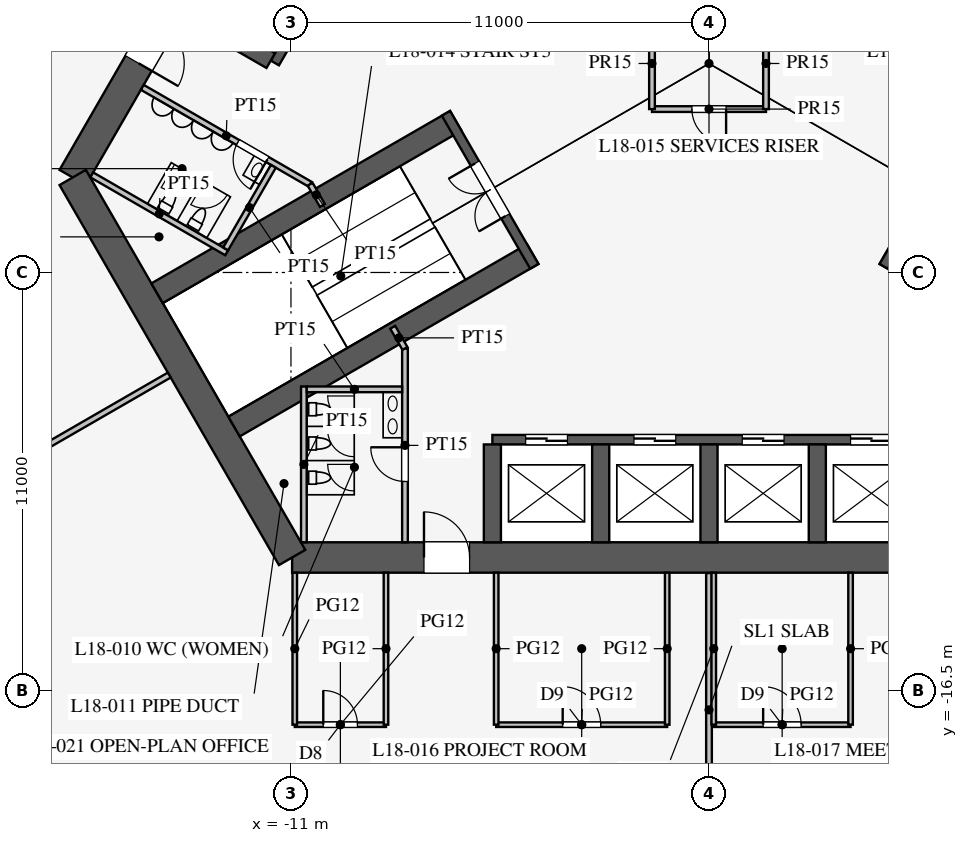
"""IFC4 building model, lengths in metres.
Left out: names, types, materials, properties, quantities, classifications, styles, units other than length and angle.
Written with IfcOpenShell. Run it as: python <this file> out.ifc"""

import sys

from ifc_helpers import new_model, si_unit, direction, frame, frame_2d, origin, place, context, subcontext, project, spatial, rectangle, extrude, element, fill, save


model = new_model("IFC4")
c1 = context("Model", 3, precision=1e-05, world=origin(), true_north=direction((0.0, 1.0)))
c2 = subcontext(c1, "Body", "Model", "MODEL_VIEW")
j1 = project(units=[si_unit("LENGTHUNIT", "METRE"), si_unit("PLANEANGLEUNIT", "RADIAN")], contexts=[c1])
p1 = place(None, origin())
s1 = spatial("IfcSite", under=j1, at=p1, CompositionType="ELEMENT")
p2 = place(p1, origin())
s2 = spatial("IfcBuilding", under=s1, at=p2, CompositionType="ELEMENT")
p3 = place(p2, frame((0.0, 0.0, 79.5)))
s3 = spatial("IfcBuildingStorey", under=s2, at=p3, CompositionType="ELEMENT", Elevation=79.5)
p4 = place(p3, frame((-10.97, -13.0, 0.0), z_axis=(0.0, 0.0, 1.0), x_axis=(1.0, 0.0, 0.0)))
e1 = element("IfcWall", 1, at=p4, inside=s3, PredefinedType="SHEAR", context=c2, shape_type="SweptSolid", body=[
    extrude(rectangle(XDim=21.939, YDim=0.8, at=frame_2d((10.97, 0.0))), origin(), (0.0, 0.0, 1.0), 4.2),
])
p5 = place(p4, frame((17.27, 0.0, 0.0)))
e2 = element("IfcOpeningElement", 2, at=p5, cuts=e1, PredefinedType="OPENING", context=c2, shape_type="SweptSolid", body=[
    extrude(rectangle(XDim=1.2, YDim=2.1, at=frame_2d((0.6, 1.05))), frame((0.0, 0.41, 0.0), z_axis=(0.0, -1.0, 0.0), x_axis=(1.0, 0.0, 0.0)), (0.0, 0.0, 1.0), 0.82),
])
p6 = place(p4, frame((3.47, 0.0, 0.0)))
e3 = element("IfcOpeningElement", 3, at=p6, cuts=e1, PredefinedType="OPENING", context=c2, shape_type="SweptSolid", body=[
    extrude(rectangle(XDim=1.2, YDim=2.1, at=frame_2d((0.6, 1.05))), frame((0.0, 0.41, 0.0), z_axis=(0.0, -1.0, 0.0), x_axis=(1.0, 0.0, 0.0)), (0.0, 0.0, 1.0), 0.82),
])
p7 = place(p3, frame((-5.773, 16.0, 0.0), z_axis=(0.0, 0.0, 1.0), x_axis=(-0.500002442456, -0.866023993627, 0.0)))
e4 = element("IfcWall", 4, at=p7, inside=s3, PredefinedType="SHEAR", context=c2, shape_type="SweptSolid", body=[
    extrude(rectangle(XDim=21.939, YDim=0.8, at=frame_2d((10.97, 0.0))), origin(), (0.0, 0.0, 1.0), 4.2),
])
p8 = place(p7, frame((17.27, 0.0, 0.0)))
e5 = element("IfcOpeningElement", 5, at=p8, cuts=e4, PredefinedType="OPENING", context=c2, shape_type="SweptSolid", body=[
    extrude(rectangle(XDim=1.2, YDim=2.1, at=frame_2d((0.6, 1.05))), frame((0.0, 0.41, 0.0), z_axis=(0.0, -1.0, 0.0), x_axis=(1.0, 0.0, 0.0)), (0.0, 0.0, 1.0), 0.82),
])
p9 = place(p7, frame((3.47, 0.0, 0.0)))
e6 = element("IfcOpeningElement", 6, at=p9, cuts=e4, PredefinedType="OPENING", context=c2, shape_type="SweptSolid", body=[
    extrude(rectangle(XDim=1.2, YDim=2.1, at=frame_2d((0.6, 1.05))), frame((0.0, 0.41, 0.0), z_axis=(0.0, -1.0, 0.0), x_axis=(1.0, 0.0, 0.0)), (0.0, 0.0, 1.0), 0.82),
])
p10 = place(p3, frame((-16.743, -3.0, 0.0), z_axis=(0.0, 0.0, 1.0), x_axis=(0.499995765644, -0.866027848477, 0.0)))
e7 = element("IfcWall", 7, at=p10, inside=s3, PredefinedType="SHEAR", context=c2, shape_type="SweptSolid", body=[
    extrude(rectangle(XDim=11.547, YDim=0.8, at=frame_2d((5.773, 0.0))), origin(), (0.0, 0.0, 1.0), 4.2),
])
p11 = place(p3, frame((-5.7, -9.9, 0.0), z_axis=(0.0, 0.0, 1.0), x_axis=(1.0, 0.0, 0.0)))
e8 = element("IfcWall", 8, at=p11, inside=s3, PredefinedType="SHEAR", context=c2, shape_type="SweptSolid", body=[
    extrude(rectangle(XDim=11.4, YDim=0.25, at=frame_2d((5.7, 0.0))), origin(), (0.0, 0.0, 1.0), 4.2),
])
p12 = place(p11, frame((0.875, 0.0, 0.0)))
e9 = element("IfcOpeningElement", 9, at=p12, cuts=e8, PredefinedType="OPENING", context=c2, shape_type="SweptSolid", body=[
    extrude(rectangle(XDim=1.1, YDim=2.2, at=frame_2d((0.55, 1.1))), frame((0.0, 0.135, 0.0), z_axis=(0.0, -1.0, 0.0), x_axis=(1.0, 0.0, 0.0)), (0.0, 0.0, 1.0), 0.27),
])
p13 = place(p11, frame((3.725, 0.0, 0.0)))
e10 = element("IfcOpeningElement", 10, at=p13, cuts=e8, PredefinedType="OPENING", context=c2, shape_type="SweptSolid", body=[
    extrude(rectangle(XDim=1.1, YDim=2.2, at=frame_2d((0.55, 1.1))), frame((0.0, 0.135, 0.0), z_axis=(0.0, -1.0, 0.0), x_axis=(1.0, 0.0, 0.0)), (0.0, 0.0, 1.0), 0.27),
])
p14 = place(p11, frame((6.575, 0.0, 0.0)))
e11 = element("IfcOpeningElement", 11, at=p14, cuts=e8, PredefinedType="OPENING", context=c2, shape_type="SweptSolid", body=[
    extrude(rectangle(XDim=1.1, YDim=2.2, at=frame_2d((0.55, 1.1))), frame((0.0, 0.135, 0.0), z_axis=(0.0, -1.0, 0.0), x_axis=(1.0, 0.0, 0.0)), (0.0, 0.0, 1.0), 0.27),
])
p15 = place(p11, frame((9.425, 0.0, 0.0)))
e12 = element("IfcOpeningElement", 12, at=p15, cuts=e8, PredefinedType="OPENING", context=c2, shape_type="SweptSolid", body=[
    extrude(rectangle(XDim=1.1, YDim=2.2, at=frame_2d((0.55, 1.1))), frame((0.0, 0.135, 0.0), z_axis=(0.0, -1.0, 0.0), x_axis=(1.0, 0.0, 0.0)), (0.0, 0.0, 1.0), 0.27),
])
for number, where, z_axis, x_axis in (
    (13, (-5.7, -10.025, 0.0), (0.0, 0.0, 1.0), (0.0, -1.0, 0.0)),
    (14, (-2.85, -10.025, 0.0), (0.0, 0.0, 1.0), (0.0, -1.0, 0.0)),
    (15, (0.0, -10.025, 0.0), (0.0, 0.0, 1.0), (0.0, -1.0, 0.0)),
    (16, (2.85, -10.025, 0.0), (0.0, 0.0, 1.0), (0.0, -1.0, 0.0)),
):
    element("IfcWall", number, at=place(p3, frame(where, z_axis=z_axis, x_axis=x_axis)), inside=s3, PredefinedType="SHEAR", context=c2, shape_type="SweptSolid", body=[
        extrude(rectangle(XDim=2.575, YDim=0.45, at=frame_2d((1.288, 0.0))), origin(), (0.0, 0.0, 1.0), 4.2),
    ])
p16 = place(p3, frame((-5.724, 9.886, 0.0), z_axis=(0.0, 0.0, 1.0), x_axis=(-0.500001763848, -0.866024385424, 0.0)))
e17 = element("IfcWall", 17, at=p16, inside=s3, PredefinedType="SHEAR", context=c2, shape_type="SweptSolid", body=[
    extrude(rectangle(XDim=11.4, YDim=0.25, at=frame_2d((5.7, 0.0))), origin(), (0.0, 0.0, 1.0), 4.2),
])
p17 = place(p16, frame((6.525, 0.0, 0.0)))
e18 = element("IfcOpeningElement", 18, at=p17, cuts=e17, PredefinedType="OPENING", context=c2, shape_type="SweptSolid", body=[
    extrude(rectangle(XDim=1.2, YDim=2.2, at=frame_2d((0.6, 1.1))), frame((0.0, 0.135, 0.0), z_axis=(0.0, -1.0, 0.0), x_axis=(1.0, 0.0, 0.0)), (0.0, 0.0, 1.0), 0.27),
])
p18 = place(p16, frame((9.375, 0.0, 0.0)))
e19 = element("IfcOpeningElement", 19, at=p18, cuts=e17, PredefinedType="OPENING", context=c2, shape_type="SweptSolid", body=[
    extrude(rectangle(XDim=1.2, YDim=2.2, at=frame_2d((0.6, 1.1))), frame((0.0, 0.135, 0.0), z_axis=(0.0, -1.0, 0.0), x_axis=(1.0, 0.0, 0.0)), (0.0, 0.0, 1.0), 0.27),
])
p19 = place(p3, frame((-11.532, 0.076, 0.0), z_axis=(0.0, 0.0, 1.0), x_axis=(-0.866005588531, 0.500034319456, 0.0)))
e20 = element("IfcWall", 20, at=p19, inside=s3, PredefinedType="SHEAR", context=c2, shape_type="SweptSolid", body=[
    extrude(rectangle(XDim=2.575, YDim=0.45, at=frame_2d((1.288, 0.0))), origin(), (0.0, 0.0, 1.0), 4.2),
])
p20 = place(p3, frame((4.638, -5.016, 0.0), z_axis=(0.0, 0.0, 1.0), x_axis=(0.866019375473, -0.500010441196, 0.0)))
e21 = element("IfcWall", 21, at=p20, inside=s3, PredefinedType="SHEAR", context=c2, shape_type="SweptSolid", body=[
    extrude(rectangle(XDim=9.075, YDim=0.6, at=frame_2d((4.538, 0.0))), origin(), (0.0, 0.0, 1.0), 4.2),
])
p21 = place(p3, frame((4.597, -5.339, 0.0), z_axis=(0.0, 0.0, 1.0), x_axis=(0.499984536904, 0.866034331223, 0.0)))
e22 = element("IfcWall", 22, at=p21, inside=s3, PredefinedType="SHEAR", context=c2, shape_type="SweptSolid", body=[
    extrude(rectangle(XDim=4.65, YDim=0.25, at=frame_2d((2.325, 0.0))), origin(), (0.0, 0.0, 1.0), 4.2),
])
p22 = place(p21, frame((1.525, 0.0, 0.0)))
e23 = element("IfcOpeningElement", 23, at=p22, cuts=e22, PredefinedType="OPENING", context=c2, shape_type="SweptSolid", body=[
    extrude(rectangle(XDim=1.6, YDim=2.1, at=frame_2d((0.8, 1.05))), frame((0.0, 0.135, 0.0), z_axis=(0.0, -1.0, 0.0), x_axis=(1.0, 0.0, 0.0)), (0.0, 0.0, 1.0), 0.27),
])
for number, where, z_axis, x_axis in (
    (24, (-6.663, -1.509, 0.0), (0.0, 0.0, 1.0), (-0.866, -0.5, 0.0)),
    (25, (-4.638, -5.016, 0.0), (0.0, 0.0, 1.0), (-0.866, -0.5, 0.0)),
):
    element("IfcWall", number, at=place(p3, frame(where, z_axis=z_axis, x_axis=x_axis)), inside=s3, PredefinedType="SHEAR", context=c2, shape_type="SweptSolid", body=[
        extrude(rectangle(XDim=9.075, YDim=0.6, at=frame_2d((4.538, 0.0))), origin(), (0.0, 0.0, 1.0), 4.2),
    ])
p23 = place(p3, frame((-6.922, -1.312, 0.0), z_axis=(0.0, 0.0, 1.0), x_axis=(0.499984536904, -0.866034331223, 0.0)))
e26 = element("IfcWall", 26, at=p23, inside=s3, PredefinedType="SHEAR", context=c2, shape_type="SweptSolid", body=[
    extrude(rectangle(XDim=4.65, YDim=0.25, at=frame_2d((2.325, 0.0))), origin(), (0.0, 0.0, 1.0), 4.2),
])
p24 = place(p23, frame((1.525, 0.0, 0.0)))
e27 = element("IfcOpeningElement", 27, at=p24, cuts=e26, PredefinedType="OPENING", context=c2, shape_type="SweptSolid", body=[
    extrude(rectangle(XDim=1.6, YDim=2.1, at=frame_2d((0.8, 1.05))), frame((0.0, 0.135, 0.0), z_axis=(0.0, -1.0, 0.0), x_axis=(1.0, 0.0, 0.0)), (0.0, 0.0, 1.0), 0.27),
])
p25 = place(p3, frame((-8.0, -7.5, 0.0), z_axis=(0.0, 0.0, 1.0), x_axis=(0.0, -1.0, 0.0)))
e28 = element("IfcWall", 28, at=p25, inside=s3, PredefinedType="PARTITIONING", context=c2, shape_type="SweptSolid", body=[
    extrude(rectangle(XDim=5.1, YDim=0.15, at=frame_2d((2.55, 0.0))), origin(), (0.0, 0.0, 1.0), 4.0),
])
p26 = place(p25, frame((2.6, 0.0, 0.0)))
e29 = element("IfcOpeningElement", 29, at=p26, cuts=e28, PredefinedType="OPENING", context=c2, shape_type="SweptSolid", body=[
    extrude(rectangle(XDim=0.9, YDim=2.1, at=frame_2d((0.45, 1.05))), frame((0.0, 0.085, 0.0), z_axis=(0.0, -1.0, 0.0), x_axis=(1.0, 0.0, 0.0)), (0.0, 0.0, 1.0), 0.17),
])
p27 = place(p3, frame((-10.495, -3.178, 0.0), z_axis=(0.0, 0.0, 1.0), x_axis=(-0.86602216432, 0.500005610874, 0.0)))
e30 = element("IfcWall", 30, at=p27, inside=s3, PredefinedType="PARTITIONING", context=c2, shape_type="SweptSolid", body=[
    extrude(rectangle(XDim=5.1, YDim=0.15, at=frame_2d((2.55, 0.0))), origin(), (0.0, 0.0, 1.0), 4.0),
])
p28 = place(p27, frame((1.3, 0.0, 0.0)))
e31 = element("IfcOpeningElement", 31, at=p28, cuts=e30, PredefinedType="OPENING", context=c2, shape_type="SweptSolid", body=[
    extrude(rectangle(XDim=0.9, YDim=2.1, at=frame_2d((0.45, 1.05))), frame((0.0, 0.085, 0.0), z_axis=(0.0, -1.0, 0.0), x_axis=(1.0, 0.0, 0.0)), (0.0, 0.0, 1.0), 0.17),
])
for number, where, z_axis, x_axis in (
    (32, (-10.495, -3.178, 0.0), (0.0, 0.0, 1.0), (0.5, -0.866, 0.0)),
    (33, (-8.0, -7.5, 0.0), (0.0, 0.0, 1.0), (-0.5, 0.866, 0.0)),
):
    element("IfcWall", number, at=place(p3, frame(where, z_axis=z_axis, x_axis=x_axis)), inside=s3, PredefinedType="PARTITIONING", context=c2, shape_type="SweptSolid", body=[
        extrude(rectangle(XDim=0.645, YDim=0.15, at=frame_2d((0.323, 0.0))), origin(), (0.0, 0.0, 1.0), 4.0),
    ])
p29 = place(p3, frame((-12.691, -4.982, 0.0), z_axis=(0.0, 0.0, 1.0), x_axis=(-0.8660249478, 0.500000789788, 0.0)))
e34 = element("IfcWall", 34, at=p29, inside=s3, PredefinedType="PARTITIONING", context=c2, shape_type="SweptSolid", body=[
    extrude(rectangle(XDim=4.1, YDim=0.15, at=frame_2d((2.05, 0.0))), origin(), (0.0, 0.0, 1.0), 4.0),
])
p30 = place(p3, frame((-11.464, -2.706, 0.0), z_axis=(0.0, 0.0, 1.0), x_axis=(-0.50001992892, -0.866013897511, 0.0)))
e35 = element("IfcWall", 35, at=p30, inside=s3, PredefinedType="PARTITIONING", context=c2, shape_type="SweptSolid", body=[
    extrude(rectangle(XDim=2.51, YDim=0.15, at=frame_2d((1.255, 0.0))), origin(), (0.0, 0.0, 1.0), 4.0),
])
p31 = place(p3, frame((-10.66, -8.5, 0.0), z_axis=(0.0, 0.0, 1.0), x_axis=(0.0, -1.0, 0.0)))
e36 = element("IfcWall", 36, at=p31, inside=s3, PredefinedType="PARTITIONING", context=c2, shape_type="SweptSolid", body=[
    extrude(rectangle(XDim=4.1, YDim=0.15, at=frame_2d((2.05, 0.0))), origin(), (0.0, 0.0, 1.0), 4.0),
])
p32 = place(p3, frame((-8.075, -8.575, 0.0), z_axis=(0.0, 0.0, 1.0), x_axis=(-1.0, 0.0, 0.0)))
e37 = element("IfcWall", 37, at=p32, inside=s3, PredefinedType="PARTITIONING", context=c2, shape_type="SweptSolid", body=[
    extrude(rectangle(XDim=2.51, YDim=0.15, at=frame_2d((1.255, 0.0))), origin(), (0.0, 0.0, 1.0), 4.0),
])
p33 = place(p3, frame((-1.5, -1.2, 0.0), z_axis=(0.0, 0.0, 1.0), x_axis=(1.0, 0.0, 0.0)))
e38 = element("IfcWall", 38, at=p33, inside=s3, PredefinedType="PARTITIONING", context=c2, shape_type="SweptSolid", body=[
    extrude(rectangle(XDim=3.0, YDim=0.15, at=frame_2d((1.5, 0.0))), origin(), (0.0, 0.0, 1.0), 4.0),
])
p34 = place(p33, frame((1.05, 0.0, 0.0)))
e39 = element("IfcOpeningElement", 39, at=p34, cuts=e38, PredefinedType="OPENING", context=c2, shape_type="SweptSolid", body=[
    extrude(rectangle(XDim=0.9, YDim=2.1, at=frame_2d((0.45, 1.05))), frame((0.0, 0.085, 0.0), z_axis=(0.0, -1.0, 0.0), x_axis=(1.0, 0.0, 0.0)), (0.0, 0.0, 1.0), 0.17),
])
for number, where, z_axis, x_axis in (
    (40, (1.5, -1.2, 0.0), (0.0, 0.0, 1.0), (0.0, 1.0, 0.0)),
    (41, (-1.5, 1.2, 0.0), (0.0, 0.0, 1.0), (0.0, -1.0, 0.0)),
):
    element("IfcWall", number, at=place(p3, frame(where, z_axis=z_axis, x_axis=x_axis)), inside=s3, PredefinedType="PARTITIONING", context=c2, shape_type="SweptSolid", body=[
        extrude(rectangle(XDim=2.4, YDim=0.15, at=frame_2d((1.2, 0.0))), origin(), (0.0, 0.0, 1.0), 4.0),
    ])
p35 = place(p3, frame((-14.203, -8.2, 0.0), z_axis=(0.0, 0.0, 1.0), x_axis=(-0.866024965723, -0.500000758745, 0.0)))
e42 = element("IfcWall", 42, at=p35, inside=s3, PredefinedType="PARTITIONING", context=c2, shape_type="SweptSolid", body=[
    extrude(rectangle(XDim=18.25, YDim=0.15, at=frame_2d((9.125, 0.0))), origin(), (0.0, 0.0, 1.0), 2.3),
])
p36 = place(p3, frame((0.0, -13.41, 0.0), z_axis=(0.0, 0.0, 1.0), x_axis=(0.0, -1.0, 0.0)))
e43 = element("IfcWall", 43, at=p36, inside=s3, PredefinedType="PARTITIONING", context=c2, shape_type="SweptSolid", body=[
    extrude(rectangle(XDim=12.709, YDim=0.15, at=frame_2d((6.354, 0.0))), origin(), (0.0, 0.0, 1.0), 2.8),
])
p37 = place(p3, frame((0.125, -17.4, 0.0), z_axis=(0.0, 0.0, 1.0), x_axis=(1.0, 0.0, 0.0)))
e44 = element("IfcWall", 44, at=p37, inside=s3, PredefinedType="PARTITIONING", context=c2, shape_type="SweptSolid", body=[
    extrude(rectangle(XDim=3.6, YDim=0.12, at=frame_2d((1.8, 0.0))), origin(), (0.0, 0.0, 1.0), 2.9),
])
p38 = place(p37, frame((1.3, 0.0, 0.15)))
e45 = element("IfcOpeningElement", 45, at=p38, cuts=e44, PredefinedType="OPENING", context=c2, shape_type="SweptSolid", body=[
    extrude(rectangle(XDim=1.0, YDim=2.1, at=frame_2d((0.5, 1.05))), frame((0.0, 0.07, 0.0), z_axis=(0.0, -1.0, 0.0), x_axis=(1.0, 0.0, 0.0)), (0.0, 0.0, 1.0), 0.14),
])
p39 = place(p3, frame((-10.9, -17.4, 0.0), z_axis=(0.0, 0.0, 1.0), x_axis=(1.0, 0.0, 0.0)))
e46 = element("IfcWall", 46, at=p39, inside=s3, PredefinedType="PARTITIONING", context=c2, shape_type="SweptSolid", body=[
    extrude(rectangle(XDim=2.4, YDim=0.12, at=frame_2d((1.2, 0.0))), origin(), (0.0, 0.0, 1.0), 2.9),
])
p40 = place(p39, frame((0.75, 0.0, 0.15)))
e47 = element("IfcOpeningElement", 47, at=p40, cuts=e46, PredefinedType="OPENING", context=c2, shape_type="SweptSolid", body=[
    extrude(rectangle(XDim=0.9, YDim=2.1, at=frame_2d((0.45, 1.05))), frame((0.0, 0.07, 0.0), z_axis=(0.0, -1.0, 0.0), x_axis=(1.0, 0.0, 0.0)), (0.0, 0.0, 1.0), 0.14),
])
p41 = place(p3, frame((-5.6, -17.4, 0.0), z_axis=(0.0, 0.0, 1.0), x_axis=(1.0, 0.0, 0.0)))
e48 = element("IfcWall", 48, at=p41, inside=s3, PredefinedType="PARTITIONING", context=c2, shape_type="SweptSolid", body=[
    extrude(rectangle(XDim=4.5, YDim=0.12, at=frame_2d((2.25, 0.0))), origin(), (0.0, 0.0, 1.0), 2.9),
])
p42 = place(p41, frame((1.75, 0.0, 0.15)))
e49 = element("IfcOpeningElement", 49, at=p42, cuts=e48, PredefinedType="OPENING", context=c2, shape_type="SweptSolid", body=[
    extrude(rectangle(XDim=1.0, YDim=2.1, at=frame_2d((0.5, 1.05))), frame((0.0, 0.07, 0.0), z_axis=(0.0, -1.0, 0.0), x_axis=(1.0, 0.0, 0.0)), (0.0, 0.0, 1.0), 0.14),
])
p43 = place(p3, frame((0.125, -13.4, 0.0), z_axis=(0.0, 0.0, 1.0), x_axis=(0.0, -1.0, 0.0)))
e50 = element("IfcWall", 50, at=p43, inside=s3, PredefinedType="PARTITIONING", context=c2, shape_type="SweptSolid", body=[
    extrude(rectangle(XDim=4.0, YDim=0.12, at=frame_2d((2.0, 0.0))), origin(), (0.0, 0.0, 1.0), 2.8),
])
for number, where, z_axis, x_axis in (
    (51, (3.725, -13.4, 0.0), (0.0, 0.0, 1.0), (0.0, -1.0, 0.0)),
    (52, (-1.1, -13.4, 0.0), (0.0, 0.0, 1.0), (0.0, -1.0, 0.0)),
    (53, (-10.9, -13.4, 0.0), (0.0, 0.0, 1.0), (0.0, -1.0, 0.0)),
    (54, (-5.6, -13.4, 0.0), (0.0, 0.0, 1.0), (0.0, -1.0, 0.0)),
    (55, (-8.5, -13.4, 0.0), (0.0, 0.0, 1.0), (0.0, -1.0, 0.0)),
):
    element("IfcWall", number, at=place(p3, frame(where, z_axis=z_axis, x_axis=x_axis)), inside=s3, PredefinedType="PARTITIONING", context=c2, shape_type="SweptSolid", body=[
        extrude(rectangle(XDim=4.0, YDim=0.12, at=frame_2d((2.0, 0.0))), origin(), (0.0, 0.0, 1.0), 2.9),
    ])
p44 = place(p26, frame((0.9, 0.0, 0.0), z_axis=(0.0, 0.0, 1.0), x_axis=(-1.0, 0.0, 0.0)))
e56 = element("IfcDoor", 56, at=p44, inside=s3, OperationType="SINGLE_SWING_RIGHT", PredefinedType="DOOR", context=c2, shape_type="SweptSolid", body=[
    extrude(rectangle(XDim=0.9, YDim=2.1, at=frame_2d((0.45, 1.05))), frame((0.0, 0.025, 0.0), z_axis=(0.0, -1.0, 0.0), x_axis=(1.0, 0.0, 0.0)), (0.0, 0.0, 1.0), 0.05),
])
fill(e29, e56)
p45 = place(p28, origin())
e57 = element("IfcDoor", 57, at=p45, inside=s3, OperationType="SINGLE_SWING_LEFT", PredefinedType="DOOR", context=c2, shape_type="SweptSolid", body=[
    extrude(rectangle(XDim=0.9, YDim=2.1, at=frame_2d((0.45, 1.05))), frame((0.0, 0.025, 0.0), z_axis=(0.0, -1.0, 0.0), x_axis=(1.0, 0.0, 0.0)), (0.0, 0.0, 1.0), 0.05),
])
fill(e31, e57)
p46 = place(p34, frame((0.9, 0.0, 0.0), z_axis=(0.0, 0.0, 1.0), x_axis=(-1.0, 0.0, 0.0)))
e58 = element("IfcDoor", 58, at=p46, inside=s3, OperationType="SINGLE_SWING_LEFT", PredefinedType="DOOR", context=c2, shape_type="SweptSolid", body=[
    extrude(rectangle(XDim=0.9, YDim=2.1, at=frame_2d((0.45, 1.05))), frame((0.0, 0.025, 0.0), z_axis=(0.0, -1.0, 0.0), x_axis=(1.0, 0.0, 0.0)), (0.0, 0.0, 1.0), 0.05),
])
fill(e39, e58)
p47 = place(p24, frame((1.6, 0.0, 0.0), z_axis=(0.0, 0.0, 1.0), x_axis=(-1.0, 0.0, 0.0)))
e59 = element("IfcDoor", 59, at=p47, inside=s3, OperationType="DOUBLE_DOOR_SINGLE_SWING", PredefinedType="DOOR", context=c2, shape_type="SweptSolid", body=[
    extrude(rectangle(XDim=1.6, YDim=2.1, at=frame_2d((0.8, 1.05))), frame((0.0, 0.025, 0.0), z_axis=(0.0, -1.0, 0.0), x_axis=(1.0, 0.0, 0.0)), (0.0, 0.0, 1.0), 0.05),
])
fill(e27, e59)
p48 = place(p6, origin())
e60 = element("IfcDoor", 60, at=p48, inside=s3, OperationType="SINGLE_SWING_LEFT", PredefinedType="DOOR", context=c2, shape_type="SweptSolid", body=[
    extrude(rectangle(XDim=1.2, YDim=2.1, at=frame_2d((0.6, 1.05))), frame((0.0, 0.025, 0.0), z_axis=(0.0, -1.0, 0.0), x_axis=(1.0, 0.0, 0.0)), (0.0, 0.0, 1.0), 0.05),
])
fill(e3, e60)
p49 = place(p8, origin())
e61 = element("IfcDoor", 61, at=p49, inside=s3, OperationType="SINGLE_SWING_RIGHT", PredefinedType="DOOR", context=c2, shape_type="SweptSolid", body=[
    extrude(rectangle(XDim=1.2, YDim=2.1, at=frame_2d((0.6, 1.05))), frame((0.0, 0.025, 0.0), z_axis=(0.0, -1.0, 0.0), x_axis=(1.0, 0.0, 0.0)), (0.0, 0.0, 1.0), 0.05),
])
fill(e5, e61)
p50 = place(p42, origin())
e62 = element("IfcDoor", 62, at=p50, inside=s3, OperationType="SINGLE_SWING_LEFT", PredefinedType="DOOR", context=c2, shape_type="SweptSolid", body=[
    extrude(rectangle(XDim=1.0, YDim=2.1, at=frame_2d((0.5, 1.05))), frame((0.0, 0.025, 0.0), z_axis=(0.0, -1.0, 0.0), x_axis=(1.0, 0.0, 0.0)), (0.0, 0.0, 1.0), 0.05),
])
fill(e49, e62)
p51 = place(p38, origin())
e63 = element("IfcDoor", 63, at=p51, inside=s3, OperationType="SINGLE_SWING_LEFT", PredefinedType="DOOR", context=c2, shape_type="SweptSolid", body=[
    extrude(rectangle(XDim=1.0, YDim=2.1, at=frame_2d((0.5, 1.05))), frame((0.0, 0.025, 0.0), z_axis=(0.0, -1.0, 0.0), x_axis=(1.0, 0.0, 0.0)), (0.0, 0.0, 1.0), 0.05),
])
fill(e45, e63)
p52 = place(p40, origin())
e64 = element("IfcDoor", 64, at=p52, inside=s3, OperationType="SINGLE_SWING_LEFT", PredefinedType="DOOR", context=c2, shape_type="SweptSolid", body=[
    extrude(rectangle(XDim=0.9, YDim=2.1, at=frame_2d((0.45, 1.05))), frame((0.0, 0.025, 0.0), z_axis=(0.0, -1.0, 0.0), x_axis=(1.0, 0.0, 0.0)), (0.0, 0.0, 1.0), 0.05),
])
fill(e47, e64)
p53 = place(p12, origin())
e65 = element("IfcDoor", 65, at=p53, inside=s3, OperationType="DOUBLE_DOOR_SLIDING", PredefinedType="DOOR", context=c2, shape_type="SweptSolid", body=[
    extrude(rectangle(XDim=1.1, YDim=2.2, at=frame_2d((0.55, 1.1))), frame((0.0, 0.025, 0.0), z_axis=(0.0, -1.0, 0.0), x_axis=(1.0, 0.0, 0.0)), (0.0, 0.0, 1.0), 0.05),
])
fill(e9, e65)
p54 = place(p13, origin())
e66 = element("IfcDoor", 66, at=p54, inside=s3, OperationType="DOUBLE_DOOR_SLIDING", PredefinedType="DOOR", context=c2, shape_type="SweptSolid", body=[
    extrude(rectangle(XDim=1.1, YDim=2.2, at=frame_2d((0.55, 1.1))), frame((0.0, 0.025, 0.0), z_axis=(0.0, -1.0, 0.0), x_axis=(1.0, 0.0, 0.0)), (0.0, 0.0, 1.0), 0.05),
])
fill(e10, e66)
p55 = place(p14, origin())
e67 = element("IfcDoor", 67, at=p55, inside=s3, OperationType="DOUBLE_DOOR_SLIDING", PredefinedType="DOOR", context=c2, shape_type="SweptSolid", body=[
    extrude(rectangle(XDim=1.1, YDim=2.2, at=frame_2d((0.55, 1.1))), frame((0.0, 0.025, 0.0), z_axis=(0.0, -1.0, 0.0), x_axis=(1.0, 0.0, 0.0)), (0.0, 0.0, 1.0), 0.05),
])
fill(e11, e67)
p56 = place(p15, origin())
e68 = element("IfcDoor", 68, at=p56, inside=s3, OperationType="DOUBLE_DOOR_SLIDING", PredefinedType="DOOR", context=c2, shape_type="SweptSolid", body=[
    extrude(rectangle(XDim=1.1, YDim=2.2, at=frame_2d((0.55, 1.1))), frame((0.0, 0.025, 0.0), z_axis=(0.0, -1.0, 0.0), x_axis=(1.0, 0.0, 0.0)), (0.0, 0.0, 1.0), 0.05),
])
fill(e12, e68)
save(model, sys.argv[1])
